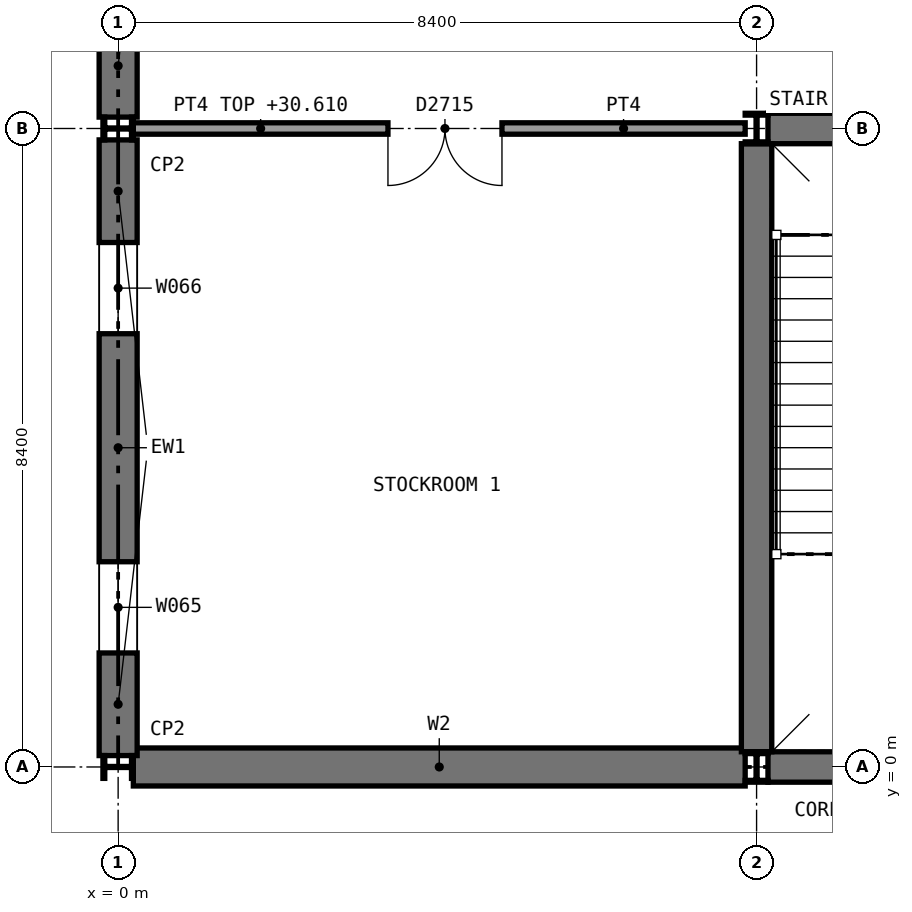
"""IFC4 building model, lengths in metres.
Left out: names, types, materials, properties, quantities, classifications, styles, units other than length and angle.
Written with IfcOpenShell. Run it as: python <this file> out.ifc"""

import sys

from ifc_helpers import new_model, si_unit, direction, frame, frame_2d, origin, origin_2d, place, context, subcontext, project, spatial, rectangle, i_section, extrude, element, fill, save


model = new_model("IFC4")
c1 = context("Model", 3, precision=1e-05, world=origin(), true_north=direction((0.0, 1.0)))
c2 = subcontext(c1, "Body", "Model", "MODEL_VIEW")
j1 = project(units=[si_unit("LENGTHUNIT", "METRE"), si_unit("PLANEANGLEUNIT", "RADIAN")], contexts=[c1])
p1 = place(None, origin())
s1 = spatial("IfcSite", under=j1, at=p1, CompositionType="ELEMENT")
p2 = place(p1, origin())
s2 = spatial("IfcBuilding", under=s1, at=p2, CompositionType="ELEMENT")
p3 = place(p2, frame((0.0, 0.0, 25.8)))
s3 = spatial("IfcBuildingStorey", under=s2, at=p3, CompositionType="ELEMENT", Elevation=25.8)
p4 = place(p3, frame((0.2, 0.0, 0.0), z_axis=(0.0, 0.0, 1.0), x_axis=(1.0, 0.0, 0.0)))
e1 = element("IfcWall", 1, at=p4, inside=s3, PredefinedType="SHEAR", context=c2, shape_type="SweptSolid", body=[
    extrude(rectangle(XDim=8.05, YDim=0.5, at=frame_2d((4.025, 0.0))), origin(), (0.0, 0.0, 1.0), 5.2),
])
p5 = place(p3, frame((8.55, 0.0, 0.0), z_axis=(0.0, 0.0, 1.0), x_axis=(1.0, 0.0, 0.0)))
e2 = element("IfcWall", 2, at=p5, inside=s3, PredefinedType="SHEAR", context=c2, shape_type="SweptSolid", body=[
    extrude(rectangle(XDim=8.1, YDim=0.4, at=frame_2d((4.05, 0.0))), origin(), (0.0, 0.0, 1.0), 4.51),
])
p6 = place(p3, frame((8.55, 8.4, 0.0), z_axis=(0.0, 0.0, 1.0), x_axis=(1.0, 0.0, 0.0)))
e3 = element("IfcWall", 3, at=p6, inside=s3, PredefinedType="SHEAR", context=c2, shape_type="SweptSolid", body=[
    extrude(rectangle(XDim=8.1, YDim=0.4, at=frame_2d((4.05, 0.0))), origin(), (0.0, 0.0, 1.0), 4.51),
])
p7 = place(p6, frame((1.15, 0.0, 0.0)))
e4 = element("IfcOpeningElement", 4, at=p7, cuts=e3, PredefinedType="OPENING", context=c2, shape_type="SweptSolid", body=[
    extrude(rectangle(XDim=1.8, YDim=2.1, at=frame_2d((0.9, 1.05))), frame((0.0, 0.21, 0.0), z_axis=(0.0, -1.0, 0.0), x_axis=(1.0, 0.0, 0.0)), (0.0, 0.0, 1.0), 0.42),
])
p8 = place(p6, frame((5.3, 0.0, 0.0)))
e5 = element("IfcOpeningElement", 5, at=p8, cuts=e3, PredefinedType="OPENING", context=c2, shape_type="SweptSolid", body=[
    extrude(rectangle(XDim=1.8, YDim=2.1, at=frame_2d((0.9, 1.05))), frame((0.0, 0.21, 0.0), z_axis=(0.0, -1.0, 0.0), x_axis=(1.0, 0.0, 0.0)), (0.0, 0.0, 1.0), 0.42),
])
p9 = place(p3, frame((8.4, 0.2, 0.0), z_axis=(0.0, 0.0, 1.0), x_axis=(0.0, 1.0, 0.0)))
e6 = element("IfcWall", 6, at=p9, inside=s3, PredefinedType="SHEAR", context=c2, shape_type="SweptSolid", body=[
    extrude(rectangle(XDim=8.0, YDim=0.4, at=frame_2d((4.0, 0.0))), origin(), (0.0, 0.0, 1.0), 5.2),
])
for number, where, z_axis, x_axis in (
    (7, (0.0, 0.0, 0.0), (0.0, 0.0, 1.0), (0.0, 1.0, 0.0)),
    (8, (0.0, 8.4, 0.0), (0.0, 0.0, 1.0), (0.0, 1.0, 0.0)),
    (9, (8.4, 0.0, 0.0), (0.0, 0.0, 1.0), (1.0, 0.0, 0.0)),
    (10, (8.4, 8.4, 0.0), (0.0, 0.0, 1.0), (1.0, 0.0, 0.0)),
):
    element("IfcColumn", number, at=place(p3, frame(where, z_axis=z_axis, x_axis=x_axis)), inside=s3, PredefinedType="COLUMN", context=c2, shape_type="SweptSolid", body=[
        extrude(i_section(OverallWidth=0.3, OverallDepth=0.4, WebThickness=0.013, FlangeThickness=0.024, FilletRadius=0.027, at=origin_2d()), origin(), (0.0, 0.0, 1.0), 5.4),
    ])
p10 = place(p3, frame((0.2, 8.4, 0.0), z_axis=(0.0, 0.0, 1.0), x_axis=(1.0, 0.0, 0.0)))
e11 = element("IfcWall", 11, at=p10, inside=s3, PredefinedType="SOLIDWALL", context=c2, shape_type="SweptSolid", body=[
    extrude(rectangle(XDim=8.05, YDim=0.15, at=frame_2d((4.025, 0.0))), origin(), (0.0, 0.0, 1.0), 4.81),
])
p11 = place(p10, frame((3.35, 0.0, 0.0)))
e12 = element("IfcOpeningElement", 12, at=p11, cuts=e11, PredefinedType="OPENING", context=c2, shape_type="SweptSolid", body=[
    extrude(rectangle(XDim=1.5, YDim=2.1, at=frame_2d((0.75, 1.05))), frame((0.0, 0.085, 0.0), z_axis=(0.0, -1.0, 0.0), x_axis=(1.0, 0.0, 0.0)), (0.0, 0.0, 1.0), 0.17),
])
p12 = place(p3, frame((0.0, 0.15, 0.0), z_axis=(0.0, 0.0, 1.0), x_axis=(0.0, 1.0, 0.0)))
e13 = element("IfcWall", 13, at=p12, inside=s3, PredefinedType="STANDARD", context=c2, shape_type="SweptSolid", body=[
    extrude(rectangle(XDim=8.1, YDim=0.5, at=frame_2d((4.05, 0.0))), origin(), (0.0, 0.0, 1.0), 5.2),
])
p13 = place(p12, frame((1.35, 0.0, 2.7)))
e14 = element("IfcOpeningElement", 14, at=p13, cuts=e13, PredefinedType="OPENING", context=c2, shape_type="SweptSolid", body=[
    extrude(rectangle(XDim=1.2, YDim=1.2, at=frame_2d((0.6, 0.6))), frame((0.0, 0.26, 0.0), z_axis=(0.0, -1.0, 0.0), x_axis=(1.0, 0.0, 0.0)), (0.0, 0.0, 1.0), 0.52),
])
p14 = place(p12, frame((5.55, 0.0, 2.7)))
e15 = element("IfcOpeningElement", 15, at=p14, cuts=e13, PredefinedType="OPENING", context=c2, shape_type="SweptSolid", body=[
    extrude(rectangle(XDim=1.2, YDim=1.2, at=frame_2d((0.6, 0.6))), frame((0.0, 0.26, 0.0), z_axis=(0.0, -1.0, 0.0), x_axis=(1.0, 0.0, 0.0)), (0.0, 0.0, 1.0), 0.52),
])
p15 = place(p3, frame((0.0, 8.55, 0.0), z_axis=(0.0, 0.0, 1.0), x_axis=(0.0, 1.0, 0.0)))
e16 = element("IfcWall", 16, at=p15, inside=s3, PredefinedType="STANDARD", context=c2, shape_type="SweptSolid", body=[
    extrude(rectangle(XDim=8.1, YDim=0.5, at=frame_2d((4.05, 0.0))), origin(), (0.0, 0.0, 1.0), 5.2),
])
p16 = place(p15, frame((1.35, 0.0, 2.7)))
e17 = element("IfcOpeningElement", 17, at=p16, cuts=e16, PredefinedType="OPENING", context=c2, shape_type="SweptSolid", body=[
    extrude(rectangle(XDim=1.2, YDim=1.2, at=frame_2d((0.6, 0.6))), frame((0.0, 0.26, 0.0), z_axis=(0.0, -1.0, 0.0), x_axis=(1.0, 0.0, 0.0)), (0.0, 0.0, 1.0), 0.52),
])
p17 = place(p15, frame((5.55, 0.0, 2.7)))
e18 = element("IfcOpeningElement", 18, at=p17, cuts=e16, PredefinedType="OPENING", context=c2, shape_type="SweptSolid", body=[
    extrude(rectangle(XDim=1.2, YDim=1.2, at=frame_2d((0.6, 0.6))), frame((0.0, 0.26, 0.0), z_axis=(0.0, -1.0, 0.0), x_axis=(1.0, 0.0, 0.0)), (0.0, 0.0, 1.0), 0.52),
])
p18 = place(p11, frame((1.5, 0.0, 0.0), z_axis=(0.0, 0.0, 1.0), x_axis=(-1.0, 0.0, 0.0)))
e19 = element("IfcDoor", 19, at=p18, inside=s3, OperationType="DOUBLE_DOOR_SINGLE_SWING", PredefinedType="DOOR", context=c2, shape_type="SweptSolid", body=[
    extrude(rectangle(XDim=1.5, YDim=2.1, at=frame_2d((0.75, 1.05))), frame((0.0, 0.025, 0.0), z_axis=(0.0, -1.0, 0.0), x_axis=(1.0, 0.0, 0.0)), (0.0, 0.0, 1.0), 0.05),
])
fill(e12, e19)
p19 = place(p13, origin())
e20 = element("IfcWindow", 20, at=p19, inside=s3, PartitioningType="SINGLE_PANEL", PredefinedType="WINDOW", context=c2, shape_type="SweptSolid", body=[
    extrude(rectangle(XDim=1.2, YDim=1.2, at=frame_2d((0.6, 0.6))), frame((0.0, 0.03, 0.0), z_axis=(0.0, -1.0, 0.0), x_axis=(1.0, 0.0, 0.0)), (0.0, 0.0, 1.0), 0.06),
])
fill(e14, e20)
p20 = place(p14, origin())
e21 = element("IfcWindow", 21, at=p20, inside=s3, PartitioningType="SINGLE_PANEL", PredefinedType="WINDOW", context=c2, shape_type="SweptSolid", body=[
    extrude(rectangle(XDim=1.2, YDim=1.2, at=frame_2d((0.6, 0.6))), frame((0.0, 0.03, 0.0), z_axis=(0.0, -1.0, 0.0), x_axis=(1.0, 0.0, 0.0)), (0.0, 0.0, 1.0), 0.06),
])
fill(e15, e21)
save(model, sys.argv[1])
